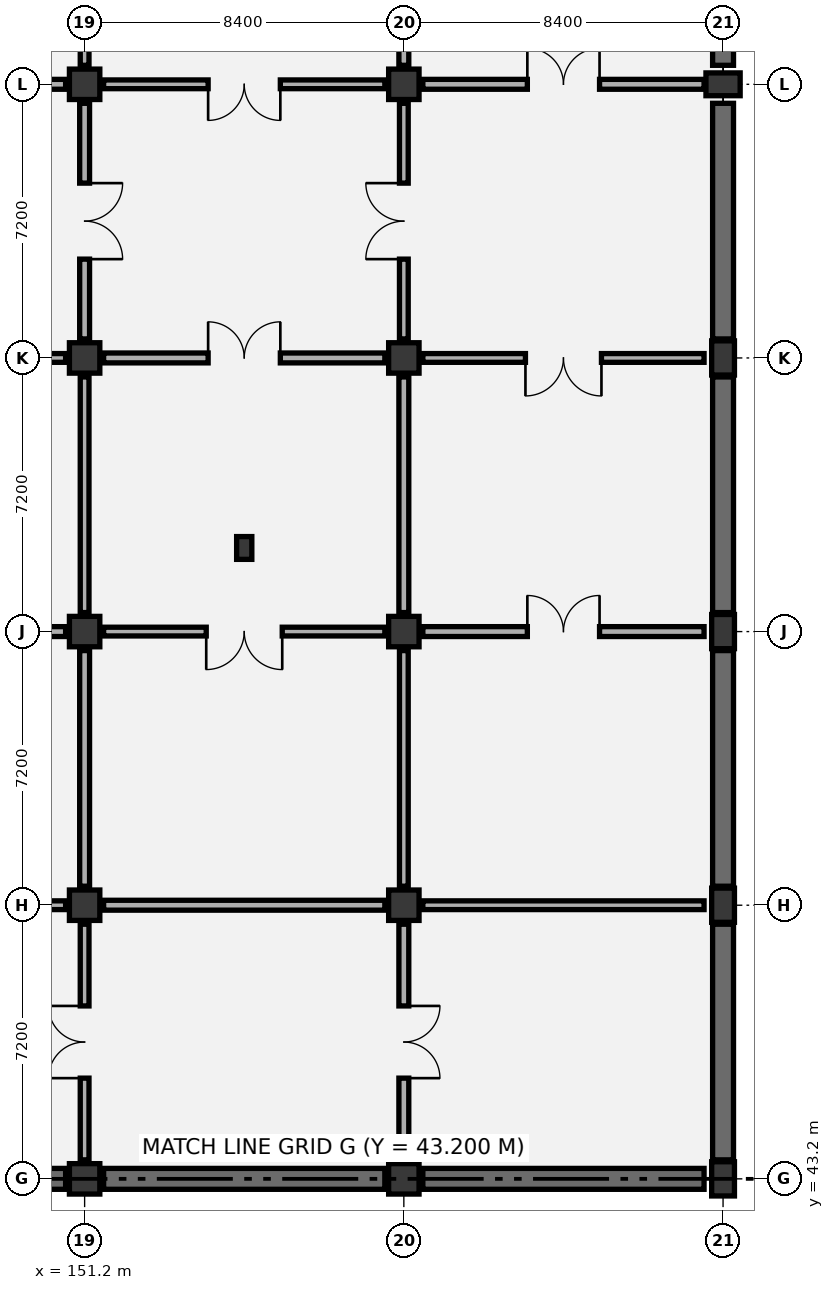
"""IFC4 building model, lengths in metres.
Left out: names, types, materials, properties, quantities, classifications, styles, units other than length and angle.
Written with IfcOpenShell. Run it as: python <this file> out.ifc"""

import sys

from ifc_helpers import new_model, si_unit, direction, frame, frame_2d, origin, origin_2d, place, context, subcontext, project, spatial, rectangle, extrude, element, fill, save


model = new_model("IFC4")
c1 = context("Model", 3, precision=1e-05, world=origin(), true_north=direction((0.0, 1.0)))
c2 = subcontext(c1, "Body", "Model", "MODEL_VIEW")
j1 = project(units=[si_unit("LENGTHUNIT", "METRE"), si_unit("PLANEANGLEUNIT", "RADIAN")], contexts=[c1])
p1 = place(None, origin())
s1 = spatial("IfcSite", under=j1, at=p1, CompositionType="ELEMENT")
p2 = place(p1, origin())
s2 = spatial("IfcBuilding", under=s1, at=p2, CompositionType="ELEMENT")
p3 = place(p2, frame((0.0, 0.0, -9.6)))
s3 = spatial("IfcBuildingStorey", under=s2, at=p3, CompositionType="ELEMENT", Elevation=-9.6)
for number, where, z_axis, x_axis in (
    (1, (151.2, 43.2, 0.0), (0.0, 0.0, 1.0), (1.0, 0.0, 0.0)),
    (2, (151.2, 50.4, 0.0), (0.0, 0.0, 1.0), (1.0, 0.0, 0.0)),
    (3, (151.2, 57.6, 0.0), (0.0, 0.0, 1.0), (1.0, 0.0, 0.0)),
    (4, (151.2, 64.8, 0.0), (0.0, 0.0, 1.0), (1.0, 0.0, 0.0)),
    (5, (151.2, 72.0, 0.0), (0.0, 0.0, 1.0), (1.0, 0.0, 0.0)),
    (6, (159.6, 43.2, 0.0), (0.0, 0.0, 1.0), (1.0, 0.0, 0.0)),
    (7, (159.6, 50.4, 0.0), (0.0, 0.0, 1.0), (1.0, 0.0, 0.0)),
    (8, (159.6, 57.6, 0.0), (0.0, 0.0, 1.0), (1.0, 0.0, 0.0)),
    (9, (159.6, 64.8, 0.0), (0.0, 0.0, 1.0), (1.0, 0.0, 0.0)),
    (10, (159.6, 72.0, 0.0), (0.0, 0.0, 1.0), (1.0, 0.0, 0.0)),
):
    element("IfcColumn", number, at=place(p3, frame(where, z_axis=z_axis, x_axis=x_axis)), inside=s3, PredefinedType="COLUMN", context=c2, shape_type="SweptSolid", body=[
        extrude(rectangle(XDim=0.8, YDim=0.8, at=origin_2d()), origin(), (0.0, 0.0, 1.0), 4.8),
    ])
for number, where, z_axis, x_axis in (
    (11, (168.0, 43.2, 0.0), (0.0, 0.0, 1.0), (1.0, 0.0, 0.0)),
    (12, (168.0, 50.4, 0.0), (0.0, 0.0, 1.0), (1.0, 0.0, 0.0)),
    (13, (168.0, 57.6, 0.0), (0.0, 0.0, 1.0), (1.0, 0.0, 0.0)),
    (14, (168.0, 64.8, 0.0), (0.0, 0.0, 1.0), (1.0, 0.0, 0.0)),
    (15, (168.0, 72.0, 0.0), (0.0, 0.0, 1.0), (0.0, 1.0, 0.0)),
):
    element("IfcColumn", number, at=place(p3, frame(where, z_axis=z_axis, x_axis=x_axis)), inside=s3, PredefinedType="COLUMN", context=c2, shape_type="SweptSolid", body=[
        extrude(rectangle(XDim=0.6, YDim=0.9, at=origin_2d()), origin(), (0.0, 0.0, 1.0), 4.8),
    ])
p4 = place(p3, frame((155.4, 59.8, 0.0), z_axis=(0.0, 0.0, 1.0), x_axis=(1.0, 0.0, 0.0)))
e16 = element("IfcColumn", 16, at=p4, inside=s3, PredefinedType="PILASTER", context=c2, shape_type="SweptSolid", body=[
    extrude(rectangle(XDim=0.4, YDim=0.6, at=origin_2d()), origin(), (0.0, 0.0, 1.0), 4.8),
])
p5 = place(p3, frame((143.3, 43.2, 0.0), z_axis=(0.0, 0.0, 1.0), x_axis=(1.0, 0.0, 0.0)))
e17 = element("IfcWall", 17, at=p5, inside=s3, PredefinedType="USERDEFINED", context=c2, shape_type="SweptSolid", body=[
    extrude(rectangle(XDim=7.4, YDim=0.55, at=frame_2d((3.7, 0.0))), origin(), (0.0, 0.0, 1.0), 4.4),
])
p6 = place(p3, frame((151.7, 43.2, 0.0), z_axis=(0.0, 0.0, 1.0), x_axis=(1.0, 0.0, 0.0)))
e18 = element("IfcWall", 18, at=p6, inside=s3, PredefinedType="USERDEFINED", context=c2, shape_type="SweptSolid", body=[
    extrude(rectangle(XDim=7.4, YDim=0.55, at=frame_2d((3.7, 0.0))), origin(), (0.0, 0.0, 1.0), 4.4),
])
p7 = place(p3, frame((160.1, 43.2, 0.0), z_axis=(0.0, 0.0, 1.0), x_axis=(1.0, 0.0, 0.0)))
e19 = element("IfcWall", 19, at=p7, inside=s3, PredefinedType="USERDEFINED", context=c2, shape_type="SweptSolid", body=[
    extrude(rectangle(XDim=7.4, YDim=0.55, at=frame_2d((3.7, 0.0))), origin(), (0.0, 0.0, 1.0), 4.4),
])
p8 = place(p3, frame((168.0, 43.7, 0.0), z_axis=(0.0, 0.0, 1.0), x_axis=(0.0, 1.0, 0.0)))
e20 = element("IfcWall", 20, at=p8, inside=s3, PredefinedType="USERDEFINED", context=c2, shape_type="SweptSolid", body=[
    extrude(rectangle(XDim=6.2, YDim=0.55, at=frame_2d((3.1, 0.0))), origin(), (0.0, 0.0, 1.0), 4.4),
])
p9 = place(p3, frame((168.0, 50.9, 0.0), z_axis=(0.0, 0.0, 1.0), x_axis=(0.0, 1.0, 0.0)))
e21 = element("IfcWall", 21, at=p9, inside=s3, PredefinedType="USERDEFINED", context=c2, shape_type="SweptSolid", body=[
    extrude(rectangle(XDim=6.2, YDim=0.55, at=frame_2d((3.1, 0.0))), origin(), (0.0, 0.0, 1.0), 4.4),
])
for number, where, z_axis, x_axis in (
    (22, (168.0, 58.1, 0.0), (0.0, 0.0, 1.0), (0.0, 1.0, 0.0)),
    (23, (168.0, 65.3, 0.0), (0.0, 0.0, 1.0), (0.0, 1.0, 0.0)),
    (24, (168.0, 72.5, 0.0), (0.0, 0.0, 1.0), (0.0, 1.0, 0.0)),
):
    element("IfcWall", number, at=place(p3, frame(where, z_axis=z_axis, x_axis=x_axis)), inside=s3, PredefinedType="USERDEFINED", context=c2, shape_type="SweptSolid", body=[
        extrude(rectangle(XDim=6.2, YDim=0.55, at=frame_2d((3.1, 0.0))), origin(), (0.0, 0.0, 1.0), 4.4),
    ])
p10 = place(p3, frame((151.2, 43.7, 0.0), z_axis=(0.0, 0.0, 1.0), x_axis=(0.0, 1.0, 0.0)))
e25 = element("IfcWall", 25, at=p10, inside=s3, PredefinedType="PARTITIONING", context=c2, shape_type="SweptSolid", body=[
    extrude(rectangle(XDim=6.2, YDim=0.23, at=frame_2d((3.1, 0.0))), origin(), (0.0, 0.0, 1.0), 3.595),
])
p11 = place(p10, frame((2.15, 0.0, 0.0)))
e26 = element("IfcOpeningElement", 26, at=p11, cuts=e25, PredefinedType="OPENING", context=c2, shape_type="SweptSolid", body=[
    extrude(rectangle(XDim=1.9, YDim=2.3, at=frame_2d((0.95, 1.15))), frame((0.0, 0.125, 0.0), z_axis=(0.0, -1.0, 0.0), x_axis=(1.0, 0.0, 0.0)), (0.0, 0.0, 1.0), 0.25),
])
p12 = place(p3, frame((143.3, 50.4, 0.0), z_axis=(0.0, 0.0, 1.0), x_axis=(1.0, 0.0, 0.0)))
e27 = element("IfcWall", 27, at=p12, inside=s3, PredefinedType="PARTITIONING", context=c2, shape_type="SweptSolid", body=[
    extrude(rectangle(XDim=7.4, YDim=0.23, at=frame_2d((3.7, 0.0))), origin(), (0.0, 0.0, 1.0), 3.495),
])
p13 = place(p3, frame((151.2, 50.9, 0.0), z_axis=(0.0, 0.0, 1.0), x_axis=(0.0, 1.0, 0.0)))
e28 = element("IfcWall", 28, at=p13, inside=s3, PredefinedType="PARTITIONING", context=c2, shape_type="SweptSolid", body=[
    extrude(rectangle(XDim=6.2, YDim=0.26, at=frame_2d((3.1, 0.0))), origin(), (0.0, 0.0, 1.0), 3.595),
])
p14 = place(p3, frame((143.3, 57.6, 0.0), z_axis=(0.0, 0.0, 1.0), x_axis=(1.0, 0.0, 0.0)))
e29 = element("IfcWall", 29, at=p14, inside=s3, PredefinedType="PARTITIONING", context=c2, shape_type="SweptSolid", body=[
    extrude(rectangle(XDim=7.4, YDim=0.26, at=frame_2d((3.7, 0.0))), origin(), (0.0, 0.0, 1.0), 3.495),
])
p15 = place(p14, frame((2.7, 0.0, 0.0)))
e30 = element("IfcOpeningElement", 30, at=p15, cuts=e29, PredefinedType="OPENING", context=c2, shape_type="SweptSolid", body=[
    extrude(rectangle(XDim=2.0, YDim=2.35, at=frame_2d((1.0, 1.175))), frame((0.0, 0.14, 0.0), z_axis=(0.0, -1.0, 0.0), x_axis=(1.0, 0.0, 0.0)), (0.0, 0.0, 1.0), 0.28),
])
p16 = place(p3, frame((151.2, 58.1, 0.0), z_axis=(0.0, 0.0, 1.0), x_axis=(0.0, 1.0, 0.0)))
e31 = element("IfcWall", 31, at=p16, inside=s3, PredefinedType="PARTITIONING", context=c2, shape_type="SweptSolid", body=[
    extrude(rectangle(XDim=6.2, YDim=0.23, at=frame_2d((3.1, 0.0))), origin(), (0.0, 0.0, 1.0), 3.595),
])
p17 = place(p3, frame((143.3, 64.8, 0.0), z_axis=(0.0, 0.0, 1.0), x_axis=(1.0, 0.0, 0.0)))
e32 = element("IfcWall", 32, at=p17, inside=s3, PredefinedType="PARTITIONING", context=c2, shape_type="SweptSolid", body=[
    extrude(rectangle(XDim=7.4, YDim=0.23, at=frame_2d((3.7, 0.0))), origin(), (0.0, 0.0, 1.0), 3.495),
])
p18 = place(p17, frame((2.75, 0.0, 0.0)))
e33 = element("IfcOpeningElement", 33, at=p18, cuts=e32, PredefinedType="OPENING", context=c2, shape_type="SweptSolid", body=[
    extrude(rectangle(XDim=1.9, YDim=2.3, at=frame_2d((0.95, 1.15))), frame((0.0, 0.125, 0.0), z_axis=(0.0, -1.0, 0.0), x_axis=(1.0, 0.0, 0.0)), (0.0, 0.0, 1.0), 0.25),
])
p19 = place(p3, frame((151.2, 65.3, 0.0), z_axis=(0.0, 0.0, 1.0), x_axis=(0.0, 1.0, 0.0)))
e34 = element("IfcWall", 34, at=p19, inside=s3, PredefinedType="PARTITIONING", context=c2, shape_type="SweptSolid", body=[
    extrude(rectangle(XDim=6.2, YDim=0.26, at=frame_2d((3.1, 0.0))), origin(), (0.0, 0.0, 1.0), 3.595),
])
p20 = place(p19, frame((2.1, 0.0, 0.0)))
e35 = element("IfcOpeningElement", 35, at=p20, cuts=e34, PredefinedType="OPENING", context=c2, shape_type="SweptSolid", body=[
    extrude(rectangle(XDim=2.0, YDim=2.35, at=frame_2d((1.0, 1.175))), frame((0.0, 0.14, 0.0), z_axis=(0.0, -1.0, 0.0), x_axis=(1.0, 0.0, 0.0)), (0.0, 0.0, 1.0), 0.28),
])
p21 = place(p3, frame((143.3, 72.0, 0.0), z_axis=(0.0, 0.0, 1.0), x_axis=(1.0, 0.0, 0.0)))
e36 = element("IfcWall", 36, at=p21, inside=s3, PredefinedType="PARTITIONING", context=c2, shape_type="SweptSolid", body=[
    extrude(rectangle(XDim=7.4, YDim=0.26, at=frame_2d((3.7, 0.0))), origin(), (0.0, 0.0, 1.0), 3.495),
])
p22 = place(p21, frame((2.75, 0.0, 0.0)))
e37 = element("IfcOpeningElement", 37, at=p22, cuts=e36, PredefinedType="OPENING", context=c2, shape_type="SweptSolid", body=[
    extrude(rectangle(XDim=1.9, YDim=2.3, at=frame_2d((0.95, 1.15))), frame((0.0, 0.14, 0.0), z_axis=(0.0, -1.0, 0.0), x_axis=(1.0, 0.0, 0.0)), (0.0, 0.0, 1.0), 0.28),
])
p23 = place(p3, frame((151.2, 72.5, 0.0), z_axis=(0.0, 0.0, 1.0), x_axis=(0.0, 1.0, 0.0)))
e38 = element("IfcWall", 38, at=p23, inside=s3, PredefinedType="PARTITIONING", context=c2, shape_type="SweptSolid", body=[
    extrude(rectangle(XDim=6.2, YDim=0.23, at=frame_2d((3.1, 0.0))), origin(), (0.0, 0.0, 1.0), 3.595),
])
p24 = place(p3, frame((159.6, 43.7, 0.0), z_axis=(0.0, 0.0, 1.0), x_axis=(0.0, 1.0, 0.0)))
e39 = element("IfcWall", 39, at=p24, inside=s3, PredefinedType="PARTITIONING", context=c2, shape_type="SweptSolid", body=[
    extrude(rectangle(XDim=6.2, YDim=0.26, at=frame_2d((3.1, 0.0))), origin(), (0.0, 0.0, 1.0), 3.595),
])
p25 = place(p24, frame((2.15, 0.0, 0.0)))
e40 = element("IfcOpeningElement", 40, at=p25, cuts=e39, PredefinedType="OPENING", context=c2, shape_type="SweptSolid", body=[
    extrude(rectangle(XDim=1.9, YDim=2.3, at=frame_2d((0.95, 1.15))), frame((0.0, 0.14, 0.0), z_axis=(0.0, -1.0, 0.0), x_axis=(1.0, 0.0, 0.0)), (0.0, 0.0, 1.0), 0.28),
])
p26 = place(p3, frame((151.7, 50.4, 0.0), z_axis=(0.0, 0.0, 1.0), x_axis=(1.0, 0.0, 0.0)))
e41 = element("IfcWall", 41, at=p26, inside=s3, PredefinedType="PARTITIONING", context=c2, shape_type="SweptSolid", body=[
    extrude(rectangle(XDim=7.4, YDim=0.26, at=frame_2d((3.7, 0.0))), origin(), (0.0, 0.0, 1.0), 3.495),
])
p27 = place(p3, frame((159.6, 50.9, 0.0), z_axis=(0.0, 0.0, 1.0), x_axis=(0.0, 1.0, 0.0)))
e42 = element("IfcWall", 42, at=p27, inside=s3, PredefinedType="PARTITIONING", context=c2, shape_type="SweptSolid", body=[
    extrude(rectangle(XDim=6.2, YDim=0.23, at=frame_2d((3.1, 0.0))), origin(), (0.0, 0.0, 1.0), 3.595),
])
p28 = place(p3, frame((151.7, 57.6, 0.0), z_axis=(0.0, 0.0, 1.0), x_axis=(1.0, 0.0, 0.0)))
e43 = element("IfcWall", 43, at=p28, inside=s3, PredefinedType="PARTITIONING", context=c2, shape_type="SweptSolid", body=[
    extrude(rectangle(XDim=7.4, YDim=0.23, at=frame_2d((3.7, 0.0))), origin(), (0.0, 0.0, 1.0), 3.495),
])
p29 = place(p28, frame((2.7, 0.0, 0.0)))
e44 = element("IfcOpeningElement", 44, at=p29, cuts=e43, PredefinedType="OPENING", context=c2, shape_type="SweptSolid", body=[
    extrude(rectangle(XDim=2.0, YDim=2.35, at=frame_2d((1.0, 1.175))), frame((0.0, 0.125, 0.0), z_axis=(0.0, -1.0, 0.0), x_axis=(1.0, 0.0, 0.0)), (0.0, 0.0, 1.0), 0.25),
])
p30 = place(p3, frame((159.6, 58.1, 0.0), z_axis=(0.0, 0.0, 1.0), x_axis=(0.0, 1.0, 0.0)))
e45 = element("IfcWall", 45, at=p30, inside=s3, PredefinedType="PARTITIONING", context=c2, shape_type="SweptSolid", body=[
    extrude(rectangle(XDim=6.2, YDim=0.26, at=frame_2d((3.1, 0.0))), origin(), (0.0, 0.0, 1.0), 3.595),
])
p31 = place(p3, frame((151.7, 64.8, 0.0), z_axis=(0.0, 0.0, 1.0), x_axis=(1.0, 0.0, 0.0)))
e46 = element("IfcWall", 46, at=p31, inside=s3, PredefinedType="PARTITIONING", context=c2, shape_type="SweptSolid", body=[
    extrude(rectangle(XDim=7.4, YDim=0.26, at=frame_2d((3.7, 0.0))), origin(), (0.0, 0.0, 1.0), 3.495),
])
p32 = place(p31, frame((2.75, 0.0, 0.0)))
e47 = element("IfcOpeningElement", 47, at=p32, cuts=e46, PredefinedType="OPENING", context=c2, shape_type="SweptSolid", body=[
    extrude(rectangle(XDim=1.9, YDim=2.3, at=frame_2d((0.95, 1.15))), frame((0.0, 0.14, 0.0), z_axis=(0.0, -1.0, 0.0), x_axis=(1.0, 0.0, 0.0)), (0.0, 0.0, 1.0), 0.28),
])
p33 = place(p3, frame((159.6, 65.3, 0.0), z_axis=(0.0, 0.0, 1.0), x_axis=(0.0, 1.0, 0.0)))
e48 = element("IfcWall", 48, at=p33, inside=s3, PredefinedType="PARTITIONING", context=c2, shape_type="SweptSolid", body=[
    extrude(rectangle(XDim=6.2, YDim=0.23, at=frame_2d((3.1, 0.0))), origin(), (0.0, 0.0, 1.0), 3.595),
])
p34 = place(p33, frame((2.1, 0.0, 0.0)))
e49 = element("IfcOpeningElement", 49, at=p34, cuts=e48, PredefinedType="OPENING", context=c2, shape_type="SweptSolid", body=[
    extrude(rectangle(XDim=2.0, YDim=2.35, at=frame_2d((1.0, 1.175))), frame((0.0, 0.125, 0.0), z_axis=(0.0, -1.0, 0.0), x_axis=(1.0, 0.0, 0.0)), (0.0, 0.0, 1.0), 0.25),
])
p35 = place(p3, frame((151.7, 72.0, 0.0), z_axis=(0.0, 0.0, 1.0), x_axis=(1.0, 0.0, 0.0)))
e50 = element("IfcWall", 50, at=p35, inside=s3, PredefinedType="PARTITIONING", context=c2, shape_type="SweptSolid", body=[
    extrude(rectangle(XDim=7.4, YDim=0.23, at=frame_2d((3.7, 0.0))), origin(), (0.0, 0.0, 1.0), 3.495),
])
p36 = place(p35, frame((2.75, 0.0, 0.0)))
e51 = element("IfcOpeningElement", 51, at=p36, cuts=e50, PredefinedType="OPENING", context=c2, shape_type="SweptSolid", body=[
    extrude(rectangle(XDim=1.9, YDim=2.3, at=frame_2d((0.95, 1.15))), frame((0.0, 0.125, 0.0), z_axis=(0.0, -1.0, 0.0), x_axis=(1.0, 0.0, 0.0)), (0.0, 0.0, 1.0), 0.25),
])
p37 = place(p3, frame((159.6, 72.5, 0.0), z_axis=(0.0, 0.0, 1.0), x_axis=(0.0, 1.0, 0.0)))
e52 = element("IfcWall", 52, at=p37, inside=s3, PredefinedType="PARTITIONING", context=c2, shape_type="SweptSolid", body=[
    extrude(rectangle(XDim=6.2, YDim=0.26, at=frame_2d((3.1, 0.0))), origin(), (0.0, 0.0, 1.0), 3.595),
])
p38 = place(p3, frame((160.1, 50.4, 0.0), z_axis=(0.0, 0.0, 1.0), x_axis=(1.0, 0.0, 0.0)))
e53 = element("IfcWall", 53, at=p38, inside=s3, PredefinedType="PARTITIONING", context=c2, shape_type="SweptSolid", body=[
    extrude(rectangle(XDim=7.4, YDim=0.23, at=frame_2d((3.7, 0.0))), origin(), (0.0, 0.0, 1.0), 3.495),
])
p39 = place(p3, frame((160.1, 57.6, 0.0), z_axis=(0.0, 0.0, 1.0), x_axis=(1.0, 0.0, 0.0)))
e54 = element("IfcWall", 54, at=p39, inside=s3, PredefinedType="PARTITIONING", context=c2, shape_type="SweptSolid", body=[
    extrude(rectangle(XDim=7.4, YDim=0.26, at=frame_2d((3.7, 0.0))), origin(), (0.0, 0.0, 1.0), 3.495),
])
p40 = place(p39, frame((2.75, 0.0, 0.0)))
e55 = element("IfcOpeningElement", 55, at=p40, cuts=e54, PredefinedType="OPENING", context=c2, shape_type="SweptSolid", body=[
    extrude(rectangle(XDim=1.9, YDim=2.3, at=frame_2d((0.95, 1.15))), frame((0.0, 0.14, 0.0), z_axis=(0.0, -1.0, 0.0), x_axis=(1.0, 0.0, 0.0)), (0.0, 0.0, 1.0), 0.28),
])
p41 = place(p3, frame((160.1, 64.8, 0.0), z_axis=(0.0, 0.0, 1.0), x_axis=(1.0, 0.0, 0.0)))
e56 = element("IfcWall", 56, at=p41, inside=s3, PredefinedType="PARTITIONING", context=c2, shape_type="SweptSolid", body=[
    extrude(rectangle(XDim=7.4, YDim=0.23, at=frame_2d((3.7, 0.0))), origin(), (0.0, 0.0, 1.0), 3.495),
])
p42 = place(p41, frame((2.7, 0.0, 0.0)))
e57 = element("IfcOpeningElement", 57, at=p42, cuts=e56, PredefinedType="OPENING", context=c2, shape_type="SweptSolid", body=[
    extrude(rectangle(XDim=2.0, YDim=2.35, at=frame_2d((1.0, 1.175))), frame((0.0, 0.125, 0.0), z_axis=(0.0, -1.0, 0.0), x_axis=(1.0, 0.0, 0.0)), (0.0, 0.0, 1.0), 0.25),
])
p43 = place(p3, frame((160.1, 72.0, 0.0), z_axis=(0.0, 0.0, 1.0), x_axis=(1.0, 0.0, 0.0)))
e58 = element("IfcWall", 58, at=p43, inside=s3, PredefinedType="PARTITIONING", context=c2, shape_type="SweptSolid", body=[
    extrude(rectangle(XDim=7.4, YDim=0.26, at=frame_2d((3.7, 0.0))), origin(), (0.0, 0.0, 1.0), 3.495),
])
p44 = place(p43, frame((2.75, 0.0, 0.0)))
e59 = element("IfcOpeningElement", 59, at=p44, cuts=e58, PredefinedType="OPENING", context=c2, shape_type="SweptSolid", body=[
    extrude(rectangle(XDim=1.9, YDim=2.3, at=frame_2d((0.95, 1.15))), frame((0.0, 0.14, 0.0), z_axis=(0.0, -1.0, 0.0), x_axis=(1.0, 0.0, 0.0)), (0.0, 0.0, 1.0), 0.28),
])
p45 = place(p11, origin())
e60 = element("IfcDoor", 60, at=p45, inside=s3, OperationType="DOUBLE_DOOR_SINGLE_SWING", PredefinedType="DOOR", context=c2, shape_type="SweptSolid", body=[
    extrude(rectangle(XDim=1.9, YDim=2.3, at=frame_2d((0.95, 1.15))), frame((0.0, 0.025, 0.0), z_axis=(0.0, -1.0, 0.0), x_axis=(1.0, 0.0, 0.0)), (0.0, 0.0, 1.0), 0.05),
])
fill(e26, e60)
p46 = place(p20, frame((2.0, 0.0, 0.0), z_axis=(0.0, 0.0, 1.0), x_axis=(-1.0, 0.0, 0.0)))
e61 = element("IfcDoor", 61, at=p46, inside=s3, OperationType="DOUBLE_DOOR_SINGLE_SWING", PredefinedType="DOOR", context=c2, shape_type="SweptSolid", body=[
    extrude(rectangle(XDim=2.0, YDim=2.35, at=frame_2d((1.0, 1.175))), frame((0.0, 0.025, 0.0), z_axis=(0.0, -1.0, 0.0), x_axis=(1.0, 0.0, 0.0)), (0.0, 0.0, 1.0), 0.05),
])
fill(e35, e61)
p47 = place(p25, frame((1.9, 0.0, 0.0), z_axis=(0.0, 0.0, 1.0), x_axis=(-1.0, 0.0, 0.0)))
e62 = element("IfcDoor", 62, at=p47, inside=s3, OperationType="DOUBLE_DOOR_SINGLE_SWING", PredefinedType="DOOR", context=c2, shape_type="SweptSolid", body=[
    extrude(rectangle(XDim=1.9, YDim=2.3, at=frame_2d((0.95, 1.15))), frame((0.0, 0.025, 0.0), z_axis=(0.0, -1.0, 0.0), x_axis=(1.0, 0.0, 0.0)), (0.0, 0.0, 1.0), 0.05),
])
fill(e40, e62)
p48 = place(p29, frame((2.0, 0.0, 0.0), z_axis=(0.0, 0.0, 1.0), x_axis=(-1.0, 0.0, 0.0)))
e63 = element("IfcDoor", 63, at=p48, inside=s3, OperationType="DOUBLE_DOOR_SINGLE_SWING", PredefinedType="DOOR", context=c2, shape_type="SweptSolid", body=[
    extrude(rectangle(XDim=2.0, YDim=2.35, at=frame_2d((1.0, 1.175))), frame((0.0, 0.025, 0.0), z_axis=(0.0, -1.0, 0.0), x_axis=(1.0, 0.0, 0.0)), (0.0, 0.0, 1.0), 0.05),
])
fill(e44, e63)
p49 = place(p32, origin())
e64 = element("IfcDoor", 64, at=p49, inside=s3, OperationType="DOUBLE_DOOR_SINGLE_SWING", PredefinedType="DOOR", context=c2, shape_type="SweptSolid", body=[
    extrude(rectangle(XDim=1.9, YDim=2.3, at=frame_2d((0.95, 1.15))), frame((0.0, 0.025, 0.0), z_axis=(0.0, -1.0, 0.0), x_axis=(1.0, 0.0, 0.0)), (0.0, 0.0, 1.0), 0.05),
])
fill(e47, e64)
p50 = place(p34, origin())
e65 = element("IfcDoor", 65, at=p50, inside=s3, OperationType="DOUBLE_DOOR_SINGLE_SWING", PredefinedType="DOOR", context=c2, shape_type="SweptSolid", body=[
    extrude(rectangle(XDim=2.0, YDim=2.35, at=frame_2d((1.0, 1.175))), frame((0.0, 0.025, 0.0), z_axis=(0.0, -1.0, 0.0), x_axis=(1.0, 0.0, 0.0)), (0.0, 0.0, 1.0), 0.05),
])
fill(e49, e65)
p51 = place(p36, frame((1.9, 0.0, 0.0), z_axis=(0.0, 0.0, 1.0), x_axis=(-1.0, 0.0, 0.0)))
e66 = element("IfcDoor", 66, at=p51, inside=s3, OperationType="DOUBLE_DOOR_SINGLE_SWING", PredefinedType="DOOR", context=c2, shape_type="SweptSolid", body=[
    extrude(rectangle(XDim=1.9, YDim=2.3, at=frame_2d((0.95, 1.15))), frame((0.0, 0.025, 0.0), z_axis=(0.0, -1.0, 0.0), x_axis=(1.0, 0.0, 0.0)), (0.0, 0.0, 1.0), 0.05),
])
fill(e51, e66)
p52 = place(p40, origin())
e67 = element("IfcDoor", 67, at=p52, inside=s3, OperationType="DOUBLE_DOOR_SINGLE_SWING", PredefinedType="DOOR", context=c2, shape_type="SweptSolid", body=[
    extrude(rectangle(XDim=1.9, YDim=2.3, at=frame_2d((0.95, 1.15))), frame((0.0, 0.025, 0.0), z_axis=(0.0, -1.0, 0.0), x_axis=(1.0, 0.0, 0.0)), (0.0, 0.0, 1.0), 0.05),
])
fill(e55, e67)
p53 = place(p42, frame((2.0, 0.0, 0.0), z_axis=(0.0, 0.0, 1.0), x_axis=(-1.0, 0.0, 0.0)))
e68 = element("IfcDoor", 68, at=p53, inside=s3, OperationType="DOUBLE_DOOR_SINGLE_SWING", PredefinedType="DOOR", context=c2, shape_type="SweptSolid", body=[
    extrude(rectangle(XDim=2.0, YDim=2.35, at=frame_2d((1.0, 1.175))), frame((0.0, 0.025, 0.0), z_axis=(0.0, -1.0, 0.0), x_axis=(1.0, 0.0, 0.0)), (0.0, 0.0, 1.0), 0.05),
])
fill(e57, e68)
p54 = place(p44, origin())
e69 = element("IfcDoor", 69, at=p54, inside=s3, OperationType="DOUBLE_DOOR_SINGLE_SWING", PredefinedType="DOOR", context=c2, shape_type="SweptSolid", body=[
    extrude(rectangle(XDim=1.9, YDim=2.3, at=frame_2d((0.95, 1.15))), frame((0.0, 0.025, 0.0), z_axis=(0.0, -1.0, 0.0), x_axis=(1.0, 0.0, 0.0)), (0.0, 0.0, 1.0), 0.05),
])
fill(e59, e69)
save(model, sys.argv[1])
